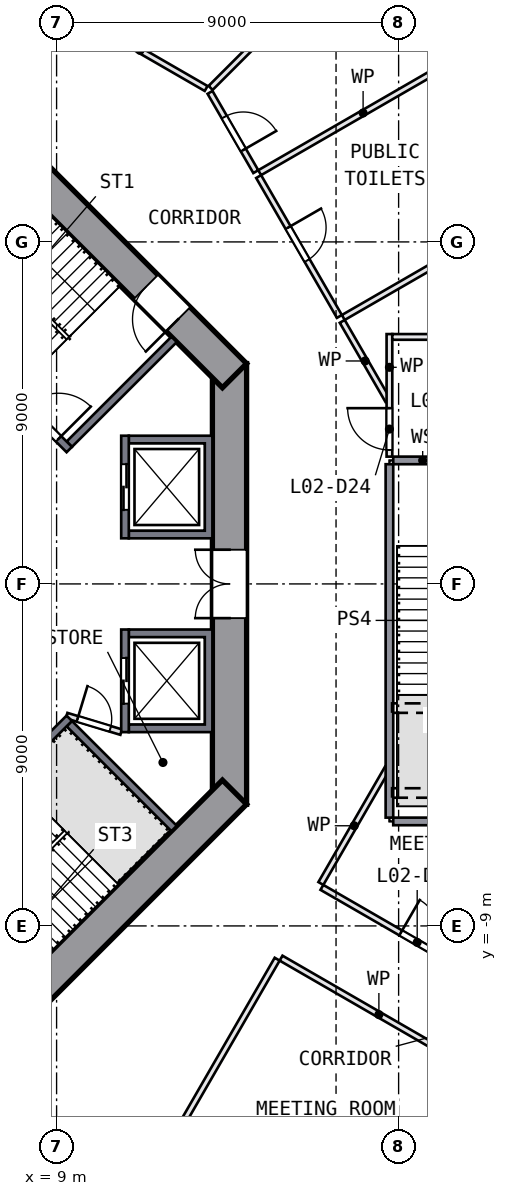
"""IFC4 building model, lengths in metres.
Left out: names, types, materials, properties, quantities, classifications, styles, units other than length and angle.
Written with IfcOpenShell. Run it as: python <this file> out.ifc"""

import sys

from ifc_helpers import new_model, si_unit, direction, frame, frame_2d, origin, place, context, subcontext, project, spatial, polyline, rectangle, outline, extrude, element, fill, save


model = new_model("IFC4")
c1 = context("Model", 3, precision=1e-05, world=origin(), true_north=direction((0.0, 1.0)))
c2 = subcontext(c1, "Body", "Model", "MODEL_VIEW")
j1 = project(units=[si_unit("LENGTHUNIT", "METRE"), si_unit("PLANEANGLEUNIT", "RADIAN")], contexts=[c1])
p1 = place(None, origin())
s1 = spatial("IfcSite", under=j1, at=p1, CompositionType="ELEMENT")
p2 = place(p1, origin())
s2 = spatial("IfcBuilding", under=s1, at=p2, CompositionType="ELEMENT")
p3 = place(p2, frame((0.0, 0.0, 14.0)))
s3 = spatial("IfcBuildingStorey", under=s2, at=p3, CompositionType="ELEMENT", Elevation=14.0)
p4 = place(p3, frame((13.55, -5.799, 0.0), z_axis=(0.0, 0.0, 1.0), x_axis=(0.0, 1.0, 0.0)))
e1 = element("IfcWall", 1, at=p4, inside=s3, PredefinedType="SHEAR", context=c2, shape_type="SweptSolid", body=[
    extrude(rectangle(XDim=11.598, YDim=0.9, at=frame_2d((5.799, 0.0))), origin(), (0.0, 0.0, 1.0), 5.0),
])
p5 = place(p4, frame((4.899, 0.0, 0.0)))
e2 = element("IfcOpeningElement", 2, at=p5, cuts=e1, PredefinedType="OPENING", context=c2, shape_type="SweptSolid", body=[
    extrude(rectangle(XDim=1.8, YDim=2.1, at=frame_2d((0.9, 1.05))), frame((0.0, 0.46, 0.0), z_axis=(0.0, -1.0, 0.0), x_axis=(1.0, 0.0, 0.0)), (0.0, 0.0, 1.0), 0.92),
])
p6 = place(p3, frame((13.682, 5.481, 0.0), z_axis=(0.0, 0.0, 1.0), x_axis=(-0.707106781, 0.707106781, 0.0)))
e3 = element("IfcWall", 3, at=p6, inside=s3, PredefinedType="SHEAR", context=c2, shape_type="SweptSolid", body=[
    extrude(rectangle(XDim=11.598, YDim=0.9, at=frame_2d((5.799, 0.0))), origin(), (0.0, 0.0, 1.0), 5.0),
])
p7 = place(p6, frame((2.099, 0.0, 0.0)))
e4 = element("IfcOpeningElement", 4, at=p7, cuts=e3, PredefinedType="OPENING", context=c2, shape_type="SweptSolid", body=[
    extrude(rectangle(XDim=1.2, YDim=2.1, at=frame_2d((0.6, 1.05))), frame((0.0, 0.46, 0.0), z_axis=(0.0, -1.0, 0.0), x_axis=(1.0, 0.0, 0.0)), (0.0, 0.0, 1.0), 0.92),
])
p8 = place(p3, frame((5.481, -13.682, 0.0), z_axis=(0.0, 0.0, 1.0), x_axis=(0.707106781, 0.707106781, 0.0)))
e5 = element("IfcWall", 5, at=p8, inside=s3, PredefinedType="SHEAR", context=c2, shape_type="SweptSolid", body=[
    extrude(rectangle(XDim=11.598, YDim=0.9, at=frame_2d((5.799, 0.0))), origin(), (0.0, 0.0, 1.0), 5.0),
])
p9 = place(p8, frame((2.099, 0.0, 0.0)))
e6 = element("IfcOpeningElement", 6, at=p9, cuts=e5, PredefinedType="OPENING", context=c2, shape_type="SweptSolid", body=[
    extrude(rectangle(XDim=1.2, YDim=2.1, at=frame_2d((0.6, 1.05))), frame((0.0, 0.46, 0.0), z_axis=(0.0, -1.0, 0.0), x_axis=(1.0, 0.0, 0.0)), (0.0, 0.0, 1.0), 0.92),
])
p10 = place(p3, frame((24.118, 6.603, 0.0), z_axis=(0.0, 0.0, 1.0), x_axis=(-0.499997984, 0.866026568, 0.0)))
e7 = element("IfcWall", 7, at=p10, inside=s3, PredefinedType="SOLIDWALL", context=c2, shape_type="SweptSolid", body=[
    extrude(rectangle(XDim=12.962, YDim=0.14, at=frame_2d((6.481, 0.0))), origin(), (0.0, 0.0, 1.0), 4.55),
])
p11 = place(p3, origin())
e8 = element("IfcWall", 8, at=p11, inside=s3, PredefinedType="SOLIDWALL", context=c2, shape_type="SweptSolid", body=[
    extrude(outline(polyline([(13.1, -3.9), (10.9, -3.9), (10.9, -3.7), (12.9, -3.7), (12.9, -1.4), (10.9, -1.4), (10.9, -1.2), (13.1, -1.2), (13.1, -3.9)])), origin(), (0.0, 0.0, 1.0), 4.55),
])
p12 = place(p3, frame((10.8, -1.2, 0.0), z_axis=(0.0, 0.0, 1.0), x_axis=(0.0, -1.0, 0.0)))
e9 = element("IfcWall", 9, at=p12, inside=s3, PredefinedType="SOLIDWALL", context=c2, shape_type="SweptSolid", body=[
    extrude(rectangle(XDim=2.7, YDim=0.2, at=frame_2d((1.35, 0.0))), origin(), (0.0, 0.0, 1.0), 4.55),
])
p13 = place(p12, frame((0.75, 0.0, 0.0)))
e10 = element("IfcOpeningElement", 10, at=p13, cuts=e9, PredefinedType="OPENING", context=c2, shape_type="SweptSolid", body=[
    extrude(rectangle(XDim=1.2, YDim=2.1, at=frame_2d((0.6, 1.05))), frame((0.0, 0.11, 0.0), z_axis=(0.0, -1.0, 0.0), x_axis=(1.0, 0.0, 0.0)), (0.0, 0.0, 1.0), 0.22),
])
p14 = place(p3, origin())
e11 = element("IfcWall", 11, at=p14, inside=s3, PredefinedType="SOLIDWALL", context=c2, shape_type="SweptSolid", body=[
    extrude(outline(polyline([(13.1, 3.9), (13.1, 1.2), (10.9, 1.2), (10.9, 1.4), (12.9, 1.4), (12.9, 3.7), (10.9, 3.7), (10.9, 3.9), (13.1, 3.9)])), origin(), (0.0, 0.0, 1.0), 4.55),
])
p15 = place(p3, frame((10.8, 1.2, 0.0), z_axis=(0.0, 0.0, 1.0), x_axis=(0.0, 1.0, 0.0)))
e12 = element("IfcWall", 12, at=p15, inside=s3, PredefinedType="SOLIDWALL", context=c2, shape_type="SweptSolid", body=[
    extrude(rectangle(XDim=2.7, YDim=0.2, at=frame_2d((1.35, 0.0))), origin(), (0.0, 0.0, 1.0), 4.55),
])
p16 = place(p15, frame((0.75, 0.0, 0.0)))
e13 = element("IfcOpeningElement", 13, at=p16, cuts=e12, PredefinedType="OPENING", context=c2, shape_type="SweptSolid", body=[
    extrude(rectangle(XDim=1.2, YDim=2.1, at=frame_2d((0.6, 1.05))), frame((0.0, 0.11, 0.0), z_axis=(0.0, -1.0, 0.0), x_axis=(1.0, 0.0, 0.0)), (0.0, 0.0, 1.0), 0.22),
])
p17 = place(p3, frame((3.535, 9.334, 0.0), z_axis=(0.0, 0.0, 1.0), x_axis=(0.707106781, -0.707106781, 0.0)))
e14 = element("IfcWall", 14, at=p17, inside=s3, PredefinedType="SOLIDWALL", context=c2, shape_type="SweptSolid", body=[
    extrude(rectangle(XDim=8.2, YDim=0.2, at=frame_2d((4.1, 0.0))), origin(), (0.0, 0.0, 1.0), 4.55),
])
p18 = place(p17, frame((6.6, 0.0, 0.0)))
e15 = element("IfcOpeningElement", 15, at=p18, cuts=e14, PredefinedType="OPENING", context=c2, shape_type="SweptSolid", body=[
    extrude(rectangle(XDim=1.2, YDim=2.1, at=frame_2d((0.6, 1.05))), frame((0.0, 0.11, 0.0), z_axis=(0.0, -1.0, 0.0), x_axis=(1.0, 0.0, 0.0)), (0.0, 0.0, 1.0), 0.22),
])
p19 = place(p3, frame((9.334, 3.677, 0.0), z_axis=(0.0, 0.0, 1.0), x_axis=(0.707106781, 0.707106781, 0.0)))
e16 = element("IfcWall", 16, at=p19, inside=s3, PredefinedType="SOLIDWALL", context=c2, shape_type="SweptSolid", body=[
    extrude(rectangle(XDim=3.9, YDim=0.2, at=frame_2d((1.95, 0.0))), origin(), (0.0, 0.0, 1.0), 4.55),
])
p20 = place(p3, frame((9.334, -3.535, 0.0), z_axis=(0.0, 0.0, 1.0), x_axis=(-0.707106781, -0.707106781, 0.0)))
e17 = element("IfcWall", 17, at=p20, inside=s3, PredefinedType="SOLIDWALL", context=c2, shape_type="SweptSolid", body=[
    extrude(rectangle(XDim=8.2, YDim=0.2, at=frame_2d((4.1, 0.0))), origin(), (0.0, 0.0, 1.0), 4.55),
])
p21 = place(p20, frame((6.6, 0.0, 0.0)))
e18 = element("IfcOpeningElement", 18, at=p21, cuts=e17, PredefinedType="OPENING", context=c2, shape_type="SweptSolid", body=[
    extrude(rectangle(XDim=1.2, YDim=2.1, at=frame_2d((0.6, 1.05))), frame((0.0, 0.11, 0.0), z_axis=(0.0, -1.0, 0.0), x_axis=(1.0, 0.0, 0.0)), (0.0, 0.0, 1.0), 0.22),
])
p22 = place(p3, frame((9.334, -3.677, 0.0), z_axis=(0.0, 0.0, 1.0), x_axis=(0.707106781, -0.707106781, 0.0)))
e19 = element("IfcWall", 19, at=p22, inside=s3, PredefinedType="SOLIDWALL", context=c2, shape_type="SweptSolid", body=[
    extrude(rectangle(XDim=3.9, YDim=0.2, at=frame_2d((1.95, 0.0))), origin(), (0.0, 0.0, 1.0), 4.55),
])
p23 = place(p3, frame((9.263, -3.465, 0.0), z_axis=(0.0, 0.0, 1.0), x_axis=(0.957084567, -0.289808785, 0.0)))
e20 = element("IfcWall", 20, at=p23, inside=s3, PredefinedType="PARTITIONING", context=c2, shape_type="SweptSolid", body=[
    extrude(rectangle(XDim=1.501, YDim=0.15, at=frame_2d((0.75, 0.0))), origin(), (0.0, 0.0, 1.0), 4.55),
])
p24 = place(p23, frame((0.301, 0.0, 0.0)))
e21 = element("IfcOpeningElement", 21, at=p24, cuts=e20, PredefinedType="OPENING", context=c2, shape_type="SweptSolid", body=[
    extrude(rectangle(XDim=0.9, YDim=2.1, at=frame_2d((0.45, 1.05))), frame((0.0, 0.085, 0.0), z_axis=(0.0, -1.0, 0.0), x_axis=(1.0, 0.0, 0.0)), (0.0, 0.0, 1.0), 0.17),
])
p25 = place(p3, frame((4.823, 17.721, 0.0), z_axis=(0.0, 0.0, 1.0), x_axis=(0.866037142, -0.499979668, 0.0)))
e22 = element("IfcWall", 22, at=p25, inside=s3, PredefinedType="PARTITIONING", context=c2, shape_type="SweptSolid", body=[
    extrude(rectangle(XDim=9.367, YDim=0.15, at=frame_2d((4.683, 0.0))), origin(), (0.0, 0.0, 1.0), 4.55),
])
p26 = place(p25, frame((4.15, 0.0, 0.0)))
e23 = element("IfcOpeningElement", 23, at=p26, cuts=e22, PredefinedType="OPENING", context=c2, shape_type="SweptSolid", body=[
    extrude(rectangle(XDim=1.0, YDim=2.1, at=frame_2d((0.5, 1.05))), frame((0.0, 0.085, 0.0), z_axis=(0.0, -1.0, 0.0), x_axis=(1.0, 0.0, 0.0)), (0.0, 0.0, 1.0), 0.17),
])
p27 = place(p3, frame((13.038, 12.935, 0.0), z_axis=(0.0, 0.0, 1.0), x_axis=(0.499933044, -0.866064057, 0.0)))
e24 = element("IfcWall", 24, at=p27, inside=s3, PredefinedType="PARTITIONING", context=c2, shape_type="SweptSolid", body=[
    extrude(rectangle(XDim=2.408, YDim=0.15, at=frame_2d((1.204, 0.0))), origin(), (0.0, 0.0, 1.0), 4.55),
])
p28 = place(p27, frame((0.75, 0.0, 0.0)))
e25 = element("IfcOpeningElement", 25, at=p28, cuts=e24, PredefinedType="OPENING", context=c2, shape_type="SweptSolid", body=[
    extrude(rectangle(XDim=1.0, YDim=2.1, at=frame_2d((0.5, 1.05))), frame((0.0, 0.085, 0.0), z_axis=(0.0, -1.0, 0.0), x_axis=(1.0, 0.0, 0.0)), (0.0, 0.0, 1.0), 0.17),
])
p29 = place(p3, frame((14.317, 10.719, 0.0), z_axis=(0.0, 0.0, 1.0), x_axis=(0.500037366, -0.866003829, 0.0)))
e26 = element("IfcWall", 26, at=p29, inside=s3, PredefinedType="PARTITIONING", context=c2, shape_type="SweptSolid", body=[
    extrude(rectangle(XDim=4.25, YDim=0.15, at=frame_2d((2.125, 0.0))), origin(), (0.0, 0.0, 1.0), 4.55),
])
p30 = place(p29, frame((1.55, 0.0, 0.0)))
e27 = element("IfcOpeningElement", 27, at=p30, cuts=e26, PredefinedType="OPENING", context=c2, shape_type="SweptSolid", body=[
    extrude(rectangle(XDim=1.0, YDim=2.1, at=frame_2d((0.5, 1.05))), frame((0.0, 0.085, 0.0), z_axis=(0.0, -1.0, 0.0), x_axis=(1.0, 0.0, 0.0)), (0.0, 0.0, 1.0), 0.17),
])
p31 = place(p3, frame((14.804, -9.875, 0.0), z_axis=(0.0, 0.0, 1.0), x_axis=(-0.4999885, -0.866032043, 0.0)))
e28 = element("IfcWall", 28, at=p31, inside=s3, PredefinedType="PARTITIONING", context=c2, shape_type="SweptSolid", body=[
    extrude(rectangle(XDim=5.375, YDim=0.15, at=frame_2d((2.688, 0.0))), origin(), (0.0, 0.0, 1.0), 4.55),
])
p32 = place(p3, frame((14.906, -9.848, 0.0), z_axis=(0.0, 0.0, 1.0), x_axis=(0.866038559, -0.499977214, 0.0)))
e29 = element("IfcWall", 29, at=p32, inside=s3, PredefinedType="PARTITIONING", context=c2, shape_type="SweptSolid", body=[
    extrude(rectangle(XDim=5.945, YDim=0.15, at=frame_2d((2.973, 0.0))), origin(), (0.0, 0.0, 1.0), 4.55),
])
p33 = place(p3, frame((16.517, 6.909, 0.0), z_axis=(0.0, 0.0, 1.0), x_axis=(0.499933044, -0.866064057, 0.0)))
e30 = element("IfcWall", 30, at=p33, inside=s3, PredefinedType="PARTITIONING", context=c2, shape_type="SweptSolid", body=[
    extrude(rectangle(XDim=2.408, YDim=0.15, at=frame_2d((1.204, 0.0))), origin(), (0.0, 0.0, 1.0), 4.55),
])
p34 = place(p3, frame((18.438, -16.585, 0.0), z_axis=(0.0, 0.0, 1.0), x_axis=(0.500027049, 0.866009787, 0.0)))
e31 = element("IfcWall", 31, at=p34, inside=s3, PredefinedType="PARTITIONING", context=c2, shape_type="SweptSolid", body=[
    extrude(rectangle(XDim=3.215, YDim=0.15, at=frame_2d((1.607, 0.0))), origin(), (0.0, 0.0, 1.0), 4.55),
])
p35 = place(p3, frame((17.858, -6.25, 0.0), z_axis=(0.0, 0.0, 1.0), x_axis=(1.0, 0.0, 0.0)))
e32 = element("IfcWall", 32, at=p35, inside=s3, PredefinedType="SOLIDWALL", context=c2, shape_type="SweptSolid", body=[
    extrude(rectangle(XDim=4.6, YDim=0.2, at=frame_2d((2.3, 0.0))), origin(), (0.0, 0.0, 1.0), 4.55),
])
p36 = place(p3, frame((17.708, -4.845, 0.0), z_axis=(0.0, 0.0, 1.0), x_axis=(-0.499993523, -0.866029143, 0.0)))
e33 = element("IfcWall", 33, at=p36, inside=s3, PredefinedType="PARTITIONING", context=c2, shape_type="SweptSolid", body=[
    extrude(rectangle(XDim=3.508, YDim=0.15, at=frame_2d((1.754, 0.0))), origin(), (0.0, 0.0, 1.0), 4.55),
])
p37 = place(p3, frame((17.758, 3.15, 0.0), z_axis=(0.0, 0.0, 1.0), x_axis=(0.0, -1.0, 0.0)))
e34 = element("IfcWall", 34, at=p37, inside=s3, PredefinedType="SOLIDWALL", context=c2, shape_type="SweptSolid", body=[
    extrude(rectangle(XDim=9.3, YDim=0.2, at=frame_2d((4.65, 0.0))), origin(), (0.0, 0.0, 1.0), 4.55),
])
p38 = place(p3, frame((17.758, 3.35, 0.0), z_axis=(0.0, 0.0, 1.0), x_axis=(0.0, 1.0, 0.0)))
e35 = element("IfcWall", 35, at=p38, inside=s3, PredefinedType="PARTITIONING", context=c2, shape_type="SweptSolid", body=[
    extrude(rectangle(XDim=3.225, YDim=0.15, at=frame_2d((1.613, 0.0))), origin(), (0.0, 0.0, 1.0), 4.55),
])
p39 = place(p38, frame((0.175, 0.0, 0.0)))
e36 = element("IfcOpeningElement", 36, at=p39, cuts=e35, PredefinedType="OPENING", context=c2, shape_type="SweptSolid", body=[
    extrude(rectangle(XDim=1.1, YDim=2.1, at=frame_2d((0.55, 1.05))), frame((0.0, 0.085, 0.0), z_axis=(0.0, -1.0, 0.0), x_axis=(1.0, 0.0, 0.0)), (0.0, 0.0, 1.0), 0.17),
])
p40 = place(p3, frame((17.7, 17.7, 0.0), z_axis=(0.0, 0.0, 1.0), x_axis=(-0.707106781, -0.707106781, 0.0)))
e37 = element("IfcWall", 37, at=p40, inside=s3, PredefinedType="PARTITIONING", context=c2, shape_type="SweptSolid", body=[
    extrude(rectangle(XDim=6.572, YDim=0.15, at=frame_2d((3.286, 0.0))), origin(), (0.0, 0.0, 1.0), 4.55),
])
p41 = place(p3, frame((19.787, 13.964, 0.0), z_axis=(0.0, 0.0, 1.0), x_axis=(-0.866042631, -0.49997016, 0.0)))
e38 = element("IfcWall", 38, at=p41, inside=s3, PredefinedType="PARTITIONING", context=c2, shape_type="SweptSolid", body=[
    extrude(rectangle(XDim=6.285, YDim=0.15, at=frame_2d((3.143, 0.0))), origin(), (0.0, 0.0, 1.0), 4.55),
])
p42 = place(p3, frame((21.987, 10.154, 0.0), z_axis=(0.0, 0.0, 1.0), x_axis=(-0.866032921, -0.49998698, 0.0)))
e39 = element("IfcWall", 39, at=p42, inside=s3, PredefinedType="PARTITIONING", context=c2, shape_type="SweptSolid", body=[
    extrude(rectangle(XDim=6.285, YDim=0.15, at=frame_2d((3.143, 0.0))), origin(), (0.0, 0.0, 1.0), 4.55),
])
p43 = place(p3, frame((17.858, 3.25, 0.0), z_axis=(0.0, 0.0, 1.0), x_axis=(1.0, 0.0, 0.0)))
e40 = element("IfcWall", 40, at=p43, inside=s3, PredefinedType="SOLIDWALL", context=c2, shape_type="SweptSolid", body=[
    extrude(rectangle(XDim=4.6, YDim=0.2, at=frame_2d((2.3, 0.0))), origin(), (0.0, 0.0, 1.0), 4.55),
])
p44 = place(p43, frame((1.75, 0.0, 0.0)))
e41 = element("IfcOpeningElement", 41, at=p44, cuts=e40, PredefinedType="OPENING", context=c2, shape_type="SweptSolid", body=[
    extrude(rectangle(XDim=1.1, YDim=2.1, at=frame_2d((0.55, 1.05))), frame((0.0, 0.11, 0.0), z_axis=(0.0, -1.0, 0.0), x_axis=(1.0, 0.0, 0.0)), (0.0, 0.0, 1.0), 0.22),
])
p45 = place(p3, frame((24.118, 6.5, 0.0), z_axis=(0.0, 0.0, 1.0), x_axis=(-1.0, 0.0, 0.0)))
e42 = element("IfcWall", 42, at=p45, inside=s3, PredefinedType="PARTITIONING", context=c2, shape_type="SweptSolid", body=[
    extrude(rectangle(XDim=6.285, YDim=0.15, at=frame_2d((3.143, 0.0))), origin(), (0.0, 0.0, 1.0), 4.55),
])
p46 = place(p45, frame((2.55, 0.0, 0.0)))
e43 = element("IfcOpeningElement", 43, at=p46, cuts=e42, PredefinedType="OPENING", context=c2, shape_type="SweptSolid", body=[
    extrude(rectangle(XDim=1.0, YDim=2.1, at=frame_2d((0.5, 1.05))), frame((0.0, 0.085, 0.0), z_axis=(0.0, -1.0, 0.0), x_axis=(1.0, 0.0, 0.0)), (0.0, 0.0, 1.0), 0.17),
])
p47 = place(p45, frame((3.95, 0.0, 0.0)))
e44 = element("IfcOpeningElement", 44, at=p47, cuts=e42, PredefinedType="OPENING", context=c2, shape_type="SweptSolid", body=[
    extrude(rectangle(XDim=1.0, YDim=2.1, at=frame_2d((0.5, 1.05))), frame((0.0, 0.085, 0.0), z_axis=(0.0, -1.0, 0.0), x_axis=(1.0, 0.0, 0.0)), (0.0, 0.0, 1.0), 0.17),
])
p48 = place(p3, frame((15.982, -7.986, 0.0), z_axis=(0.0, 0.0, 1.0), x_axis=(0.86601051, -0.500025795, 0.0)))
e45 = element("IfcWall", 45, at=p48, inside=s3, PredefinedType="PARTITIONING", context=c2, shape_type="SweptSolid", body=[
    extrude(rectangle(XDim=5.945, YDim=0.15, at=frame_2d((2.973, 0.0))), origin(), (0.0, 0.0, 1.0), 4.55),
])
p49 = place(p48, frame((2.395, 0.0, 0.0)))
e46 = element("IfcOpeningElement", 46, at=p49, cuts=e45, PredefinedType="OPENING", context=c2, shape_type="SweptSolid", body=[
    extrude(rectangle(XDim=1.0, YDim=2.1, at=frame_2d((0.5, 1.05))), frame((0.0, 0.085, 0.0), z_axis=(0.0, -1.0, 0.0), x_axis=(1.0, 0.0, 0.0)), (0.0, 0.0, 1.0), 0.17),
])
p50 = place(p13, origin())
e47 = element("IfcDoor", 47, at=p50, inside=s3, OperationType="DOUBLE_DOOR_SLIDING", PredefinedType="DOOR", context=c2, shape_type="SweptSolid", body=[
    extrude(rectangle(XDim=1.2, YDim=2.1, at=frame_2d((0.6, 1.05))), frame((0.0, 0.025, 0.0), z_axis=(0.0, -1.0, 0.0), x_axis=(1.0, 0.0, 0.0)), (0.0, 0.0, 1.0), 0.05),
])
fill(e10, e47)
p51 = place(p16, origin())
e48 = element("IfcDoor", 48, at=p51, inside=s3, OperationType="DOUBLE_DOOR_SLIDING", PredefinedType="DOOR", context=c2, shape_type="SweptSolid", body=[
    extrude(rectangle(XDim=1.2, YDim=2.1, at=frame_2d((0.6, 1.05))), frame((0.0, 0.025, 0.0), z_axis=(0.0, -1.0, 0.0), x_axis=(1.0, 0.0, 0.0)), (0.0, 0.0, 1.0), 0.05),
])
fill(e13, e48)
p52 = place(p18, origin())
e49 = element("IfcDoor", 49, at=p52, inside=s3, OperationType="SINGLE_SWING_RIGHT", PredefinedType="DOOR", context=c2, shape_type="SweptSolid", body=[
    extrude(rectangle(XDim=1.2, YDim=2.1, at=frame_2d((0.6, 1.05))), frame((0.0, 0.025, 0.0), z_axis=(0.0, -1.0, 0.0), x_axis=(1.0, 0.0, 0.0)), (0.0, 0.0, 1.0), 0.05),
])
fill(e15, e49)
p53 = place(p5, origin())
e50 = element("IfcDoor", 50, at=p53, inside=s3, OperationType="DOUBLE_DOOR_SINGLE_SWING", PredefinedType="DOOR", context=c2, shape_type="SweptSolid", body=[
    extrude(rectangle(XDim=1.8, YDim=2.1, at=frame_2d((0.9, 1.05))), frame((0.0, 0.025, 0.0), z_axis=(0.0, -1.0, 0.0), x_axis=(1.0, 0.0, 0.0)), (0.0, 0.0, 1.0), 0.05),
])
fill(e2, e50)
p54 = place(p7, origin())
e51 = element("IfcDoor", 51, at=p54, inside=s3, OperationType="SINGLE_SWING_LEFT", PredefinedType="DOOR", context=c2, shape_type="SweptSolid", body=[
    extrude(rectangle(XDim=1.2, YDim=2.1, at=frame_2d((0.6, 1.05))), frame((0.0, 0.025, 0.0), z_axis=(0.0, -1.0, 0.0), x_axis=(1.0, 0.0, 0.0)), (0.0, 0.0, 1.0), 0.05),
])
fill(e4, e51)
p55 = place(p24, origin())
e52 = element("IfcDoor", 52, at=p55, inside=s3, OperationType="SINGLE_SWING_LEFT", PredefinedType="DOOR", context=c2, shape_type="SweptSolid", body=[
    extrude(rectangle(XDim=0.9, YDim=2.1, at=frame_2d((0.45, 1.05))), frame((0.0, 0.025, 0.0), z_axis=(0.0, -1.0, 0.0), x_axis=(1.0, 0.0, 0.0)), (0.0, 0.0, 1.0), 0.05),
])
fill(e21, e52)
p56 = place(p28, origin())
e53 = element("IfcDoor", 53, at=p56, inside=s3, OperationType="SINGLE_SWING_RIGHT", PredefinedType="DOOR", context=c2, shape_type="SweptSolid", body=[
    extrude(rectangle(XDim=1.0, YDim=2.1, at=frame_2d((0.5, 1.05))), frame((0.0, 0.025, 0.0), z_axis=(0.0, -1.0, 0.0), x_axis=(1.0, 0.0, 0.0)), (0.0, 0.0, 1.0), 0.05),
])
fill(e25, e53)
p57 = place(p30, origin())
e54 = element("IfcDoor", 54, at=p57, inside=s3, OperationType="SINGLE_SWING_LEFT", PredefinedType="DOOR", context=c2, shape_type="SweptSolid", body=[
    extrude(rectangle(XDim=1.0, YDim=2.1, at=frame_2d((0.5, 1.05))), frame((0.0, 0.025, 0.0), z_axis=(0.0, -1.0, 0.0), x_axis=(1.0, 0.0, 0.0)), (0.0, 0.0, 1.0), 0.05),
])
fill(e27, e54)
p58 = place(p39, origin())
e55 = element("IfcDoor", 55, at=p58, inside=s3, OperationType="SINGLE_SWING_RIGHT", PredefinedType="DOOR", context=c2, shape_type="SweptSolid", body=[
    extrude(rectangle(XDim=1.1, YDim=2.1, at=frame_2d((0.55, 1.05))), frame((0.0, 0.025, 0.0), z_axis=(0.0, -1.0, 0.0), x_axis=(1.0, 0.0, 0.0)), (0.0, 0.0, 1.0), 0.05),
])
fill(e36, e55)
p59 = place(p49, origin())
e56 = element("IfcDoor", 56, at=p59, inside=s3, OperationType="SINGLE_SWING_LEFT", PredefinedType="DOOR", context=c2, shape_type="SweptSolid", body=[
    extrude(rectangle(XDim=1.0, YDim=2.1, at=frame_2d((0.5, 1.05))), frame((0.0, 0.025, 0.0), z_axis=(0.0, -1.0, 0.0), x_axis=(1.0, 0.0, 0.0)), (0.0, 0.0, 1.0), 0.05),
])
fill(e46, e56)
save(model, sys.argv[1])
